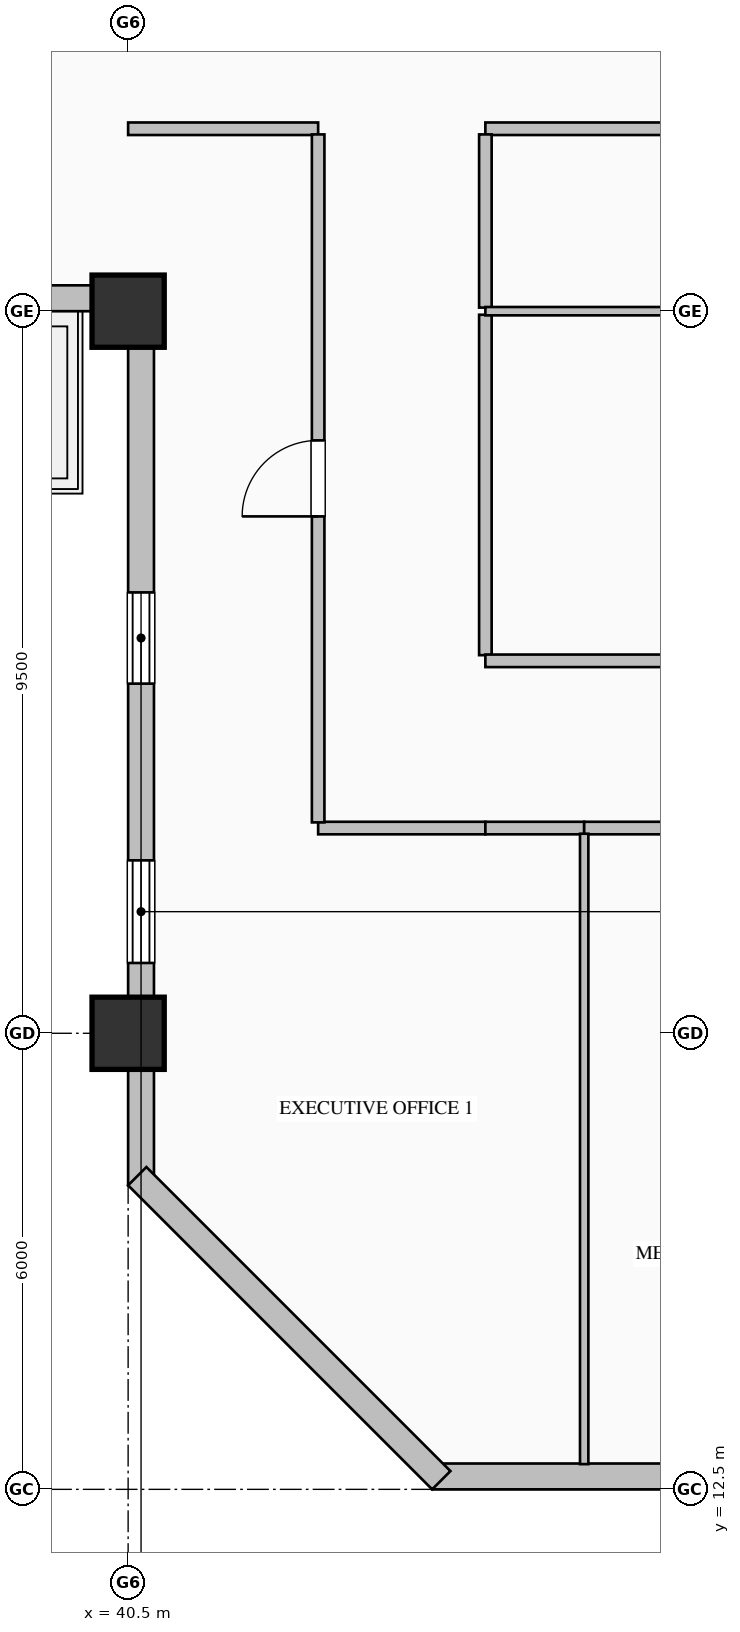
"""IFC4 building model, lengths in metres.
Left out: names, types, materials, properties, quantities, classifications, styles, units other than length and angle.
Written with IfcOpenShell. Run it as: python <this file> out.ifc"""

import sys

from ifc_helpers import new_model, si_unit, direction, frame, frame_2d, origin, origin_2d, place, context, subcontext, project, spatial, rectangle, hollow_rectangle, extrude, element, fill, save


model = new_model("IFC4")
c1 = context("Model", 3, precision=1e-05, world=origin(), true_north=direction((0.0, 1.0)))
c2 = subcontext(c1, "Body", "Model", "MODEL_VIEW")
j1 = project(units=[si_unit("LENGTHUNIT", "METRE"), si_unit("PLANEANGLEUNIT", "RADIAN")], contexts=[c1])
p1 = place(None, origin())
s1 = spatial("IfcSite", under=j1, at=p1, CompositionType="ELEMENT")
p2 = place(p1, origin())
s2 = spatial("IfcBuilding", under=s1, at=p2, CompositionType="ELEMENT")
p3 = place(p2, frame((0.0, 0.0, 205.8)))
s3 = spatial("IfcBuildingStorey", under=s2, at=p3, CompositionType="ELEMENT", Elevation=205.8)
for number, where, z_axis, x_axis in (
    (1, (40.5, 18.5, 0.0), (0.0, 0.0, 1.0), (1.0, 0.0, 0.0)),
    (2, (40.5, 28.0, 0.0), (0.0, 0.0, 1.0), (1.0, 0.0, 0.0)),
):
    element("IfcColumn", number, at=place(p3, frame(where, z_axis=z_axis, x_axis=x_axis)), inside=s3, PredefinedType="COLUMN", context=c2, shape_type="SweptSolid", body=[
        extrude(hollow_rectangle(XDim=0.95, YDim=0.95, WallThickness=0.036, at=origin_2d()), origin(), (0.0, 0.0, 1.0), 4.0),
    ])
p4 = place(p3, frame((40.67, 16.5, 0.0), z_axis=(0.0, 0.0, 1.0), x_axis=(0.0, 1.0, 0.0)))
e3 = element("IfcWall", 3, at=p4, inside=s3, PredefinedType="SOLIDWALL", context=c2, shape_type="SweptSolid", body=[
    extrude(rectangle(XDim=11.84, YDim=0.34, at=frame_2d((5.92, 0.0))), origin(), (0.0, 0.0, 1.0), 3.187),
])
p5 = place(p4, frame((2.925, 0.0, 0.9)))
e4 = element("IfcOpeningElement", 4, at=p5, cuts=e3, PredefinedType="OPENING", context=c2, shape_type="SweptSolid", body=[
    extrude(rectangle(XDim=1.35, YDim=1.85, at=frame_2d((0.675, 0.925))), frame((0.0, 0.18, 0.0), z_axis=(0.0, -1.0, 0.0), x_axis=(1.0, 0.0, 0.0)), (0.0, 0.0, 1.0), 0.36),
])
p6 = place(p4, frame((6.6, 0.0, 0.7)))
e5 = element("IfcOpeningElement", 5, at=p6, cuts=e3, PredefinedType="OPENING", context=c2, shape_type="SweptSolid", body=[
    extrude(rectangle(XDim=1.2, YDim=1.85, at=frame_2d((0.6, 0.925))), frame((0.0, 0.18, 0.0), z_axis=(0.0, -1.0, 0.0), x_axis=(1.0, 0.0, 0.0)), (0.0, 0.0, 1.0), 0.36),
])
p7 = place(p3, frame((40.52, 28.17, 0.0), z_axis=(0.0, 0.0, 1.0), x_axis=(-1.0, 0.0, 0.0)))
e6 = element("IfcWall", 6, at=p7, inside=s3, PredefinedType="SOLIDWALL", context=c2, shape_type="SweptSolid", body=[
    extrude(rectangle(XDim=27.52, YDim=0.34, at=frame_2d((13.76, 0.0))), origin(), (0.0, 0.0, 1.0), 3.187),
])
p8 = place(p7, frame((13.8, 0.0, 0.7)))
e7 = element("IfcOpeningElement", 7, at=p8, cuts=e6, PredefinedType="OPENING", context=c2, shape_type="SweptSolid", body=[
    extrude(rectangle(XDim=1.2, YDim=1.85, at=frame_2d((0.6, 0.925))), frame((0.0, 0.18, 0.0), z_axis=(0.0, -1.0, 0.0), x_axis=(1.0, 0.0, 0.0)), (0.0, 0.0, 1.0), 0.36),
])
p9 = place(p7, frame((17.4, 0.0, 0.9)))
e8 = element("IfcOpeningElement", 8, at=p9, cuts=e6, PredefinedType="OPENING", context=c2, shape_type="SweptSolid", body=[
    extrude(rectangle(XDim=1.2, YDim=1.85, at=frame_2d((0.6, 0.925))), frame((0.0, 0.18, 0.0), z_axis=(0.0, -1.0, 0.0), x_axis=(1.0, 0.0, 0.0)), (0.0, 0.0, 1.0), 0.36),
])
p10 = place(p7, frame((20.925, 0.0, 0.9)))
e9 = element("IfcOpeningElement", 9, at=p10, cuts=e6, PredefinedType="OPENING", context=c2, shape_type="SweptSolid", body=[
    extrude(rectangle(XDim=1.35, YDim=1.85, at=frame_2d((0.675, 0.925))), frame((0.0, 0.18, 0.0), z_axis=(0.0, -1.0, 0.0), x_axis=(1.0, 0.0, 0.0)), (0.0, 0.0, 1.0), 0.36),
])
p11 = place(p7, frame((11.395, 0.0, 0.0)))
e10 = element("IfcOpeningElement", 10, at=p11, cuts=e6, PredefinedType="OPENING", context=c2, shape_type="SweptSolid", body=[
    extrude(rectangle(XDim=1.25, YDim=2.25, at=frame_2d((0.625, 1.125))), frame((0.0, 0.18, 0.0), z_axis=(0.0, -1.0, 0.0), x_axis=(1.0, 0.0, 0.0)), (0.0, 0.0, 1.0), 0.36),
])
p12 = place(p3, frame((60.0, 12.67, 0.0), z_axis=(0.0, 0.0, 1.0), x_axis=(-1.0, 0.0, 0.0)))
e11 = element("IfcWall", 11, at=p12, inside=s3, PredefinedType="SOLIDWALL", context=c2, shape_type="SweptSolid", body=[
    extrude(rectangle(XDim=15.5, YDim=0.34, at=frame_2d((7.75, 0.0))), origin(), (0.0, 0.0, 1.0), 3.325),
])
p13 = place(p3, frame((44.62, 12.62, 0.0), z_axis=(0.0, 0.0, 1.0), x_axis=(-0.707106781187, 0.707106781187, 0.0)))
e12 = element("IfcWall", 12, at=p13, inside=s3, PredefinedType="SOLIDWALL", context=c2, shape_type="SweptSolid", body=[
    extrude(rectangle(XDim=5.657, YDim=0.34, at=frame_2d((2.828, 0.0))), origin(), (0.0, 0.0, 1.0), 3.775),
])
p14 = place(p3, frame((56.5, 30.4, 0.0), z_axis=(0.0, 0.0, 1.0), x_axis=(-1.0, 0.0, 0.0)))
e13 = element("IfcWall", 13, at=p14, inside=s3, PredefinedType="PARTITIONING", context=c2, shape_type="SweptSolid", body=[
    extrude(rectangle(XDim=11.3, YDim=0.165, at=frame_2d((5.65, 0.0))), origin(), (0.0, 0.0, 1.0), 3.775),
])
p15 = place(p14, frame((5.1, 0.0, 0.0)))
e14 = element("IfcOpeningElement", 14, at=p15, cuts=e13, PredefinedType="OPENING", context=c2, shape_type="SweptSolid", body=[
    extrude(rectangle(XDim=1.1, YDim=2.2, at=frame_2d((0.55, 1.1))), frame((0.0, 0.093, 0.0), z_axis=(0.0, -1.0, 0.0), x_axis=(1.0, 0.0, 0.0)), (0.0, 0.0, 1.0), 0.185),
])
p16 = place(p3, frame((43.0, 30.4, 0.0), z_axis=(0.0, 0.0, 1.0), x_axis=(-1.0, 0.0, 0.0)))
e15 = element("IfcWall", 15, at=p16, inside=s3, PredefinedType="PARTITIONING", context=c2, shape_type="SweptSolid", body=[
    extrude(rectangle(XDim=2.5, YDim=0.165, at=frame_2d((1.25, 0.0))), origin(), (0.0, 0.0, 1.0), 3.775),
])
p17 = place(p3, frame((45.2, 27.953, 0.0), z_axis=(0.0, 0.0, 1.0), x_axis=(0.0, -1.0, 0.0)))
e16 = element("IfcWall", 16, at=p17, inside=s3, PredefinedType="PARTITIONING", context=c2, shape_type="SweptSolid", body=[
    extrude(rectangle(XDim=4.478, YDim=0.165, at=frame_2d((2.239, 0.0))), origin(), (0.0, 0.0, 1.0), 3.775),
])
p18 = place(p3, frame((45.2, 30.325, 0.0), z_axis=(0.0, 0.0, 1.0), x_axis=(0.0, -1.0, 0.0)))
e17 = element("IfcWall", 17, at=p18, inside=s3, PredefinedType="PARTITIONING", context=c2, shape_type="SweptSolid", body=[
    extrude(rectangle(XDim=2.278, YDim=0.165, at=frame_2d((1.139, 0.0))), origin(), (0.0, 0.0, 1.0), 3.775),
])
p19 = place(p3, frame((45.2, 21.2, 0.0), z_axis=(0.0, 0.0, 1.0), x_axis=(-1.0, 0.0, 0.0)))
e18 = element("IfcWall", 18, at=p19, inside=s3, PredefinedType="PARTITIONING", context=c2, shape_type="SweptSolid", body=[
    extrude(rectangle(XDim=2.2, YDim=0.165, at=frame_2d((1.1, 0.0))), origin(), (0.0, 0.0, 1.0), 3.775),
])
p20 = place(p3, frame((43.0, 21.274, 0.0), z_axis=(0.0, 0.0, 1.0), x_axis=(0.0, 1.0, 0.0)))
e19 = element("IfcWall", 19, at=p20, inside=s3, PredefinedType="PARTITIONING", context=c2, shape_type="SweptSolid", body=[
    extrude(rectangle(XDim=9.051, YDim=0.165, at=frame_2d((4.525, 0.0))), origin(), (0.0, 0.0, 1.0), 3.775),
])
p21 = place(p20, frame((4.025, 0.0, 0.0)))
e20 = element("IfcOpeningElement", 20, at=p21, cuts=e19, PredefinedType="OPENING", context=c2, shape_type="SweptSolid", body=[
    extrude(rectangle(XDim=1.0, YDim=2.15, at=frame_2d((0.5, 1.075))), frame((0.0, 0.093, 0.0), z_axis=(0.0, -1.0, 0.0), x_axis=(1.0, 0.0, 0.0)), (0.0, 0.0, 1.0), 0.185),
])
p22 = place(p3, frame((45.2, 23.4, 0.0), z_axis=(0.0, 0.0, 1.0), x_axis=(1.0, 0.0, 0.0)))
e21 = element("IfcWall", 21, at=p22, inside=s3, PredefinedType="PARTITIONING", context=c2, shape_type="SweptSolid", body=[
    extrude(rectangle(XDim=12.8, YDim=0.165, at=frame_2d((6.4, 0.0))), origin(), (0.0, 0.0, 1.0), 3.467),
])
p23 = place(p22, frame((5.9, 0.0, 0.0)))
e22 = element("IfcOpeningElement", 22, at=p23, cuts=e21, PredefinedType="OPENING", context=c2, shape_type="SweptSolid", body=[
    extrude(rectangle(XDim=1.0, YDim=2.15, at=frame_2d((0.5, 1.075))), frame((0.0, 0.093, 0.0), z_axis=(0.0, -1.0, 0.0), x_axis=(1.0, 0.0, 0.0)), (0.0, 0.0, 1.0), 0.185),
])
p24 = place(p3, frame((46.5, 21.2, 0.0), z_axis=(0.0, 0.0, 1.0), x_axis=(-1.0, 0.0, 0.0)))
e23 = element("IfcWall", 23, at=p24, inside=s3, PredefinedType="PARTITIONING", context=c2, shape_type="SweptSolid", body=[
    extrude(rectangle(XDim=1.3, YDim=0.165, at=frame_2d((0.65, 0.0))), origin(), (0.0, 0.0, 1.0), 3.775),
])
p25 = place(p3, frame((50.0, 21.2, 0.0), z_axis=(0.0, 0.0, 1.0), x_axis=(-1.0, 0.0, 0.0)))
e24 = element("IfcWall", 24, at=p25, inside=s3, PredefinedType="PARTITIONING", context=c2, shape_type="SweptSolid", body=[
    extrude(rectangle(XDim=3.5, YDim=0.165, at=frame_2d((1.75, 0.0))), origin(), (0.0, 0.0, 1.0), 3.775),
])
p26 = place(p25, frame((1.2, 0.0, 0.0)))
e25 = element("IfcOpeningElement", 25, at=p26, cuts=e24, PredefinedType="OPENING", context=c2, shape_type="SweptSolid", body=[
    extrude(rectangle(XDim=1.1, YDim=2.2, at=frame_2d((0.55, 1.1))), frame((0.0, 0.093, 0.0), z_axis=(0.0, -1.0, 0.0), x_axis=(1.0, 0.0, 0.0)), (0.0, 0.0, 1.0), 0.185),
])
p27 = place(p3, frame((45.2, 28.0, 0.0), z_axis=(0.0, 0.0, 1.0), x_axis=(1.0, 0.0, 0.0)))
e26 = element("IfcWall", 26, at=p27, inside=s3, PredefinedType="MOVABLE", context=c2, shape_type="SweptSolid", body=[
    extrude(rectangle(XDim=18.528, YDim=0.11, at=frame_2d((9.264, 0.0))), origin(), (0.0, 0.0, 1.0), 3.179),
])
p28 = place(p3, frame((46.5, 21.125, 0.0), z_axis=(0.0, 0.0, 1.0), x_axis=(0.0, -1.0, 0.0)))
e27 = element("IfcWall", 27, at=p28, inside=s3, PredefinedType="MOVABLE", context=c2, shape_type="SweptSolid", body=[
    extrude(rectangle(XDim=8.293, YDim=0.11, at=frame_2d((4.147, 0.0))), origin(), (0.0, 0.0, 1.0), 3.775),
])
p29 = place(p5, origin())
e28 = element("IfcWindow", 28, at=p29, inside=s3, PartitioningType="DOUBLE_PANEL_VERTICAL", PredefinedType="WINDOW", context=c2, shape_type="SweptSolid", body=[
    extrude(rectangle(XDim=1.35, YDim=1.85, at=frame_2d((0.675, 0.925))), frame((0.0, 0.15, 0.0), z_axis=(0.0, -1.0, 0.0), x_axis=(1.0, 0.0, 0.0)), (0.0, 0.0, 1.0), 0.06),
])
fill(e4, e28)
p30 = place(p6, origin())
e29 = element("IfcWindow", 29, at=p30, inside=s3, PartitioningType="DOUBLE_PANEL_VERTICAL", PredefinedType="WINDOW", context=c2, shape_type="SweptSolid", body=[
    extrude(rectangle(XDim=1.2, YDim=1.85, at=frame_2d((0.6, 0.925))), frame((0.0, 0.15, 0.0), z_axis=(0.0, -1.0, 0.0), x_axis=(1.0, 0.0, 0.0)), (0.0, 0.0, 1.0), 0.06),
])
fill(e5, e29)
p31 = place(p21, origin())
e30 = element("IfcDoor", 30, at=p31, inside=s3, OperationType="SINGLE_SWING_LEFT", PredefinedType="DOOR", context=c2, shape_type="SweptSolid", body=[
    extrude(rectangle(XDim=1.0, YDim=2.15, at=frame_2d((0.5, 1.075))), frame((0.0, 0.025, 0.0), z_axis=(0.0, -1.0, 0.0), x_axis=(1.0, 0.0, 0.0)), (0.0, 0.0, 1.0), 0.05),
])
fill(e20, e30)
save(model, sys.argv[1])
